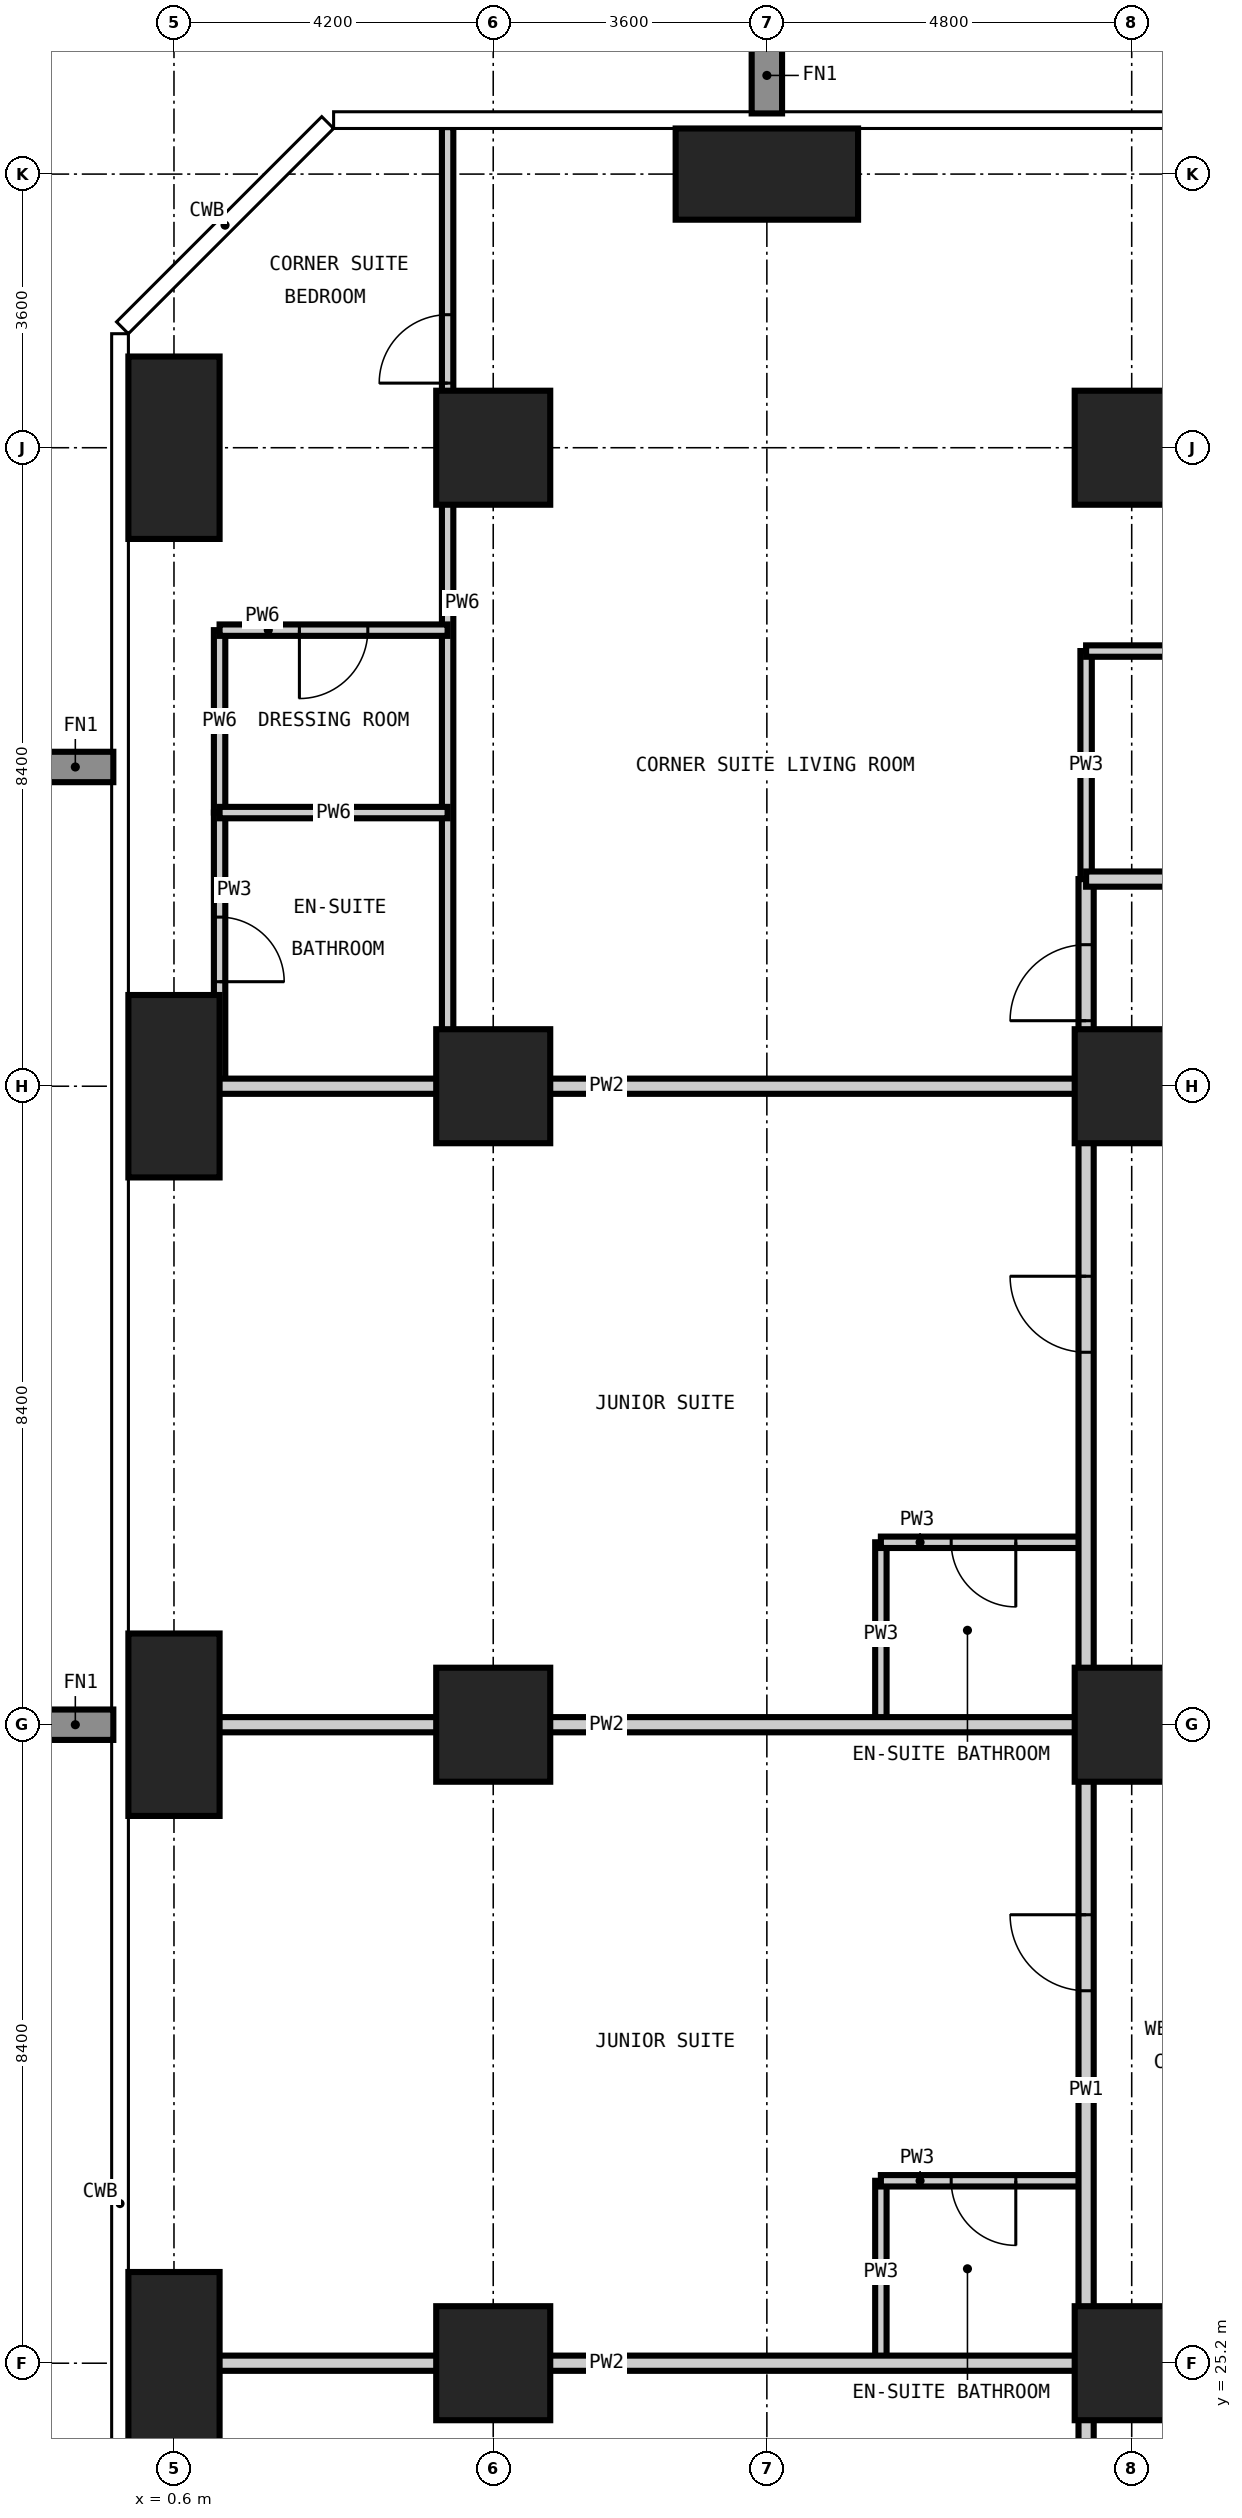
"""IFC4 building model, lengths in metres.
Left out: names, types, materials, properties, quantities, classifications, styles, units other than length and angle.
Written with IfcOpenShell. Run it as: python <this file> out.ifc"""

import sys

from ifc_helpers import new_model, si_unit, direction, frame, frame_2d, origin, origin_2d, place, context, subcontext, project, spatial, rectangle, extrude, element, fill, save


model = new_model("IFC4")
c1 = context("Model", 3, precision=1e-05, world=origin(), true_north=direction((0.0, 1.0)))
c2 = subcontext(c1, "Body", "Model", "MODEL_VIEW")
j1 = project(units=[si_unit("LENGTHUNIT", "METRE"), si_unit("PLANEANGLEUNIT", "RADIAN")], contexts=[c1])
p1 = place(None, origin())
s1 = spatial("IfcSite", under=j1, at=p1, CompositionType="ELEMENT")
p2 = place(p1, origin())
s2 = spatial("IfcBuilding", under=s1, at=p2, CompositionType="ELEMENT")
p3 = place(p2, frame((0.0, 0.0, 111.6)))
s3 = spatial("IfcBuildingStorey", under=s2, at=p3, CompositionType="ELEMENT", Elevation=111.6)
for number, where, z_axis, x_axis in (
    (1, (0.6, 25.2, -0.35), (0.0, 0.0, 1.0), (1.0, 0.0, 0.0)),
    (2, (0.6, 33.6, -0.35), (0.0, 0.0, 1.0), (1.0, 0.0, 0.0)),
    (3, (0.6, 42.0, -0.35), (0.0, 0.0, 1.0), (1.0, 0.0, 0.0)),
    (4, (0.6, 50.4, -0.35), (0.0, 0.0, 1.0), (1.0, 0.0, 0.0)),
):
    element("IfcColumn", number, at=place(p3, frame(where, z_axis=z_axis, x_axis=x_axis)), inside=s3, PredefinedType="COLUMN", context=c2, shape_type="SweptSolid", body=[
        extrude(rectangle(XDim=1.2, YDim=2.4, at=origin_2d()), origin(), (0.0, 0.0, 1.0), 3.6),
    ])
for number, where, z_axis, x_axis in (
    (5, (4.8, 25.2, -0.35), (0.0, 0.0, 1.0), (1.0, 0.0, 0.0)),
    (6, (4.8, 33.6, -0.35), (0.0, 0.0, 1.0), (1.0, 0.0, 0.0)),
    (7, (4.8, 42.0, -0.35), (0.0, 0.0, 1.0), (1.0, 0.0, 0.0)),
    (8, (4.8, 50.4, -0.35), (0.0, 0.0, 1.0), (1.0, 0.0, 0.0)),
):
    element("IfcColumn", number, at=place(p3, frame(where, z_axis=z_axis, x_axis=x_axis)), inside=s3, PredefinedType="COLUMN", context=c2, shape_type="SweptSolid", body=[
        extrude(rectangle(XDim=1.5, YDim=1.5, at=origin_2d()), origin(), (0.0, 0.0, 1.0), 3.6),
    ])
p4 = place(p3, frame((8.4, 54.0, -0.35), z_axis=(0.0, 0.0, 1.0), x_axis=(1.0, 0.0, 0.0)))
e9 = element("IfcColumn", 9, at=p4, inside=s3, PredefinedType="COLUMN", context=c2, shape_type="SweptSolid", body=[
    extrude(rectangle(XDim=2.4, YDim=1.2, at=origin_2d()), origin(), (0.0, 0.0, 1.0), 3.6),
])
for number, where, z_axis, x_axis in (
    (10, (13.2, 25.2, -0.35), (0.0, 0.0, 1.0), (1.0, 0.0, 0.0)),
    (11, (13.2, 33.6, -0.35), (0.0, 0.0, 1.0), (1.0, 0.0, 0.0)),
    (12, (13.2, 42.0, -0.35), (0.0, 0.0, 1.0), (1.0, 0.0, 0.0)),
    (13, (13.2, 50.4, -0.35), (0.0, 0.0, 1.0), (1.0, 0.0, 0.0)),
):
    element("IfcColumn", number, at=place(p3, frame(where, z_axis=z_axis, x_axis=x_axis)), inside=s3, PredefinedType="COLUMN", context=c2, shape_type="SweptSolid", body=[
        extrude(rectangle(XDim=1.5, YDim=1.5, at=origin_2d()), origin(), (0.0, 0.0, 1.0), 3.6),
    ])
p5 = place(p3, frame((1.2, 42.0, 0.0), z_axis=(0.0, 0.0, 1.0), x_axis=(0.0, 1.0, 0.0)))
e14 = element("IfcWall", 14, at=p5, inside=s3, PredefinedType="PARTITIONING", context=c2, shape_type="SweptSolid", body=[
    extrude(rectangle(XDim=3.6, YDim=0.15, at=frame_2d((1.8, 0.0))), origin(), (0.0, 0.0, 1.0), 3.25),
])
p6 = place(p5, frame((1.375, 0.0, 0.0)))
e15 = element("IfcOpeningElement", 15, at=p6, cuts=e14, PredefinedType="OPENING", context=c2, shape_type="SweptSolid", body=[
    extrude(rectangle(XDim=0.85, YDim=2.1, at=frame_2d((0.425, 1.05))), frame((0.0, 0.085, 0.0), z_axis=(0.0, -1.0, 0.0), x_axis=(1.0, 0.0, 0.0)), (0.0, 0.0, 1.0), 0.17),
])
p7 = place(p3, frame((9.9, 25.2, 0.0), z_axis=(0.0, 0.0, 1.0), x_axis=(0.0, 1.0, 0.0)))
e16 = element("IfcWall", 16, at=p7, inside=s3, PredefinedType="PARTITIONING", context=c2, shape_type="SweptSolid", body=[
    extrude(rectangle(XDim=2.4, YDim=0.15, at=frame_2d((1.2, 0.0))), origin(), (0.0, 0.0, 1.0), 3.25),
])
p8 = place(p3, frame((9.9, 33.6, 0.0), z_axis=(0.0, 0.0, 1.0), x_axis=(0.0, 1.0, 0.0)))
e17 = element("IfcWall", 17, at=p8, inside=s3, PredefinedType="PARTITIONING", context=c2, shape_type="SweptSolid", body=[
    extrude(rectangle(XDim=2.4, YDim=0.15, at=frame_2d((1.2, 0.0))), origin(), (0.0, 0.0, 1.0), 3.25),
])
p9 = place(p3, frame((12.6, 44.725, 0.0), z_axis=(0.0, 0.0, 1.0), x_axis=(0.0, 1.0, 0.0)))
e18 = element("IfcWall", 18, at=p9, inside=s3, PredefinedType="PARTITIONING", context=c2, shape_type="SweptSolid", body=[
    extrude(rectangle(XDim=3.0, YDim=0.15, at=frame_2d((1.5, 0.0))), origin(), (0.0, 0.0, 1.0), 3.25),
])
p10 = place(p3, frame((9.9, 27.6, 0.0), z_axis=(0.0, 0.0, 1.0), x_axis=(1.0, 0.0, 0.0)))
e19 = element("IfcWall", 19, at=p10, inside=s3, PredefinedType="PARTITIONING", context=c2, shape_type="SweptSolid", body=[
    extrude(rectangle(XDim=2.7, YDim=0.15, at=frame_2d((1.35, 0.0))), origin(), (0.0, 0.0, 1.0), 3.25),
])
p11 = place(p10, frame((0.925, 0.0, 0.0)))
e20 = element("IfcOpeningElement", 20, at=p11, cuts=e19, PredefinedType="OPENING", context=c2, shape_type="SweptSolid", body=[
    extrude(rectangle(XDim=0.85, YDim=2.1, at=frame_2d((0.425, 1.05))), frame((0.0, 0.085, 0.0), z_axis=(0.0, -1.0, 0.0), x_axis=(1.0, 0.0, 0.0)), (0.0, 0.0, 1.0), 0.17),
])
p12 = place(p3, frame((9.9, 36.0, 0.0), z_axis=(0.0, 0.0, 1.0), x_axis=(1.0, 0.0, 0.0)))
e21 = element("IfcWall", 21, at=p12, inside=s3, PredefinedType="PARTITIONING", context=c2, shape_type="SweptSolid", body=[
    extrude(rectangle(XDim=2.7, YDim=0.15, at=frame_2d((1.35, 0.0))), origin(), (0.0, 0.0, 1.0), 3.25),
])
p13 = place(p12, frame((0.925, 0.0, 0.0)))
e22 = element("IfcOpeningElement", 22, at=p13, cuts=e21, PredefinedType="OPENING", context=c2, shape_type="SweptSolid", body=[
    extrude(rectangle(XDim=0.85, YDim=2.1, at=frame_2d((0.425, 1.05))), frame((0.0, 0.085, 0.0), z_axis=(0.0, -1.0, 0.0), x_axis=(1.0, 0.0, 0.0)), (0.0, 0.0, 1.0), 0.17),
])
p14 = place(p3, frame((12.6, 47.725, 0.0), z_axis=(0.0, 0.0, 1.0), x_axis=(1.0, 0.0, 0.0)))
e23 = element("IfcWall", 23, at=p14, inside=s3, PredefinedType="PARTITIONING", context=c2, shape_type="SweptSolid", body=[
    extrude(rectangle(XDim=4.2, YDim=0.15, at=frame_2d((2.1, 0.0))), origin(), (0.0, 0.0, 1.0), 3.25),
])
p15 = place(p14, frame((1.675, 0.0, 0.0)))
e24 = element("IfcOpeningElement", 24, at=p15, cuts=e23, PredefinedType="OPENING", context=c2, shape_type="SweptSolid", body=[
    extrude(rectangle(XDim=0.85, YDim=2.1, at=frame_2d((0.425, 1.05))), frame((0.0, 0.085, 0.0), z_axis=(0.0, -1.0, 0.0), x_axis=(1.0, 0.0, 0.0)), (0.0, 0.0, 1.0), 0.17),
])
p16 = place(p3, frame((12.6, 12.875, 0.0), z_axis=(0.0, 0.0, 1.0), x_axis=(0.0, 1.0, 0.0)))
e25 = element("IfcWall", 25, at=p16, inside=s3, PredefinedType="PARTITIONING", context=c2, shape_type="SweptSolid", body=[
    extrude(rectangle(XDim=31.85, YDim=0.2, at=frame_2d((15.925, 0.0))), origin(), (0.0, 0.0, 1.0), 3.25),
])
p17 = place(p16, frame((8.825, 0.0, 0.0)))
e26 = element("IfcOpeningElement", 26, at=p17, cuts=e25, PredefinedType="OPENING", context=c2, shape_type="SweptSolid", body=[
    extrude(rectangle(XDim=1.0, YDim=2.2, at=frame_2d((0.5, 1.1))), frame((0.0, 0.11, 0.0), z_axis=(0.0, -1.0, 0.0), x_axis=(1.0, 0.0, 0.0)), (0.0, 0.0, 1.0), 0.22),
])
p18 = place(p16, frame((17.225, 0.0, 0.0)))
e27 = element("IfcOpeningElement", 27, at=p18, cuts=e25, PredefinedType="OPENING", context=c2, shape_type="SweptSolid", body=[
    extrude(rectangle(XDim=1.0, YDim=2.2, at=frame_2d((0.5, 1.1))), frame((0.0, 0.11, 0.0), z_axis=(0.0, -1.0, 0.0), x_axis=(1.0, 0.0, 0.0)), (0.0, 0.0, 1.0), 0.22),
])
p19 = place(p16, frame((25.625, 0.0, 0.0)))
e28 = element("IfcOpeningElement", 28, at=p19, cuts=e25, PredefinedType="OPENING", context=c2, shape_type="SweptSolid", body=[
    extrude(rectangle(XDim=1.0, YDim=2.2, at=frame_2d((0.5, 1.1))), frame((0.0, 0.11, 0.0), z_axis=(0.0, -1.0, 0.0), x_axis=(1.0, 0.0, 0.0)), (0.0, 0.0, 1.0), 0.22),
])
p20 = place(p16, frame((1.463, 0.0, 0.0)))
e29 = element("IfcOpeningElement", 29, at=p20, cuts=e25, PredefinedType="OPENING", context=c2, shape_type="SweptSolid", body=[
    extrude(rectangle(XDim=1.0, YDim=2.2, at=frame_2d((0.5, 1.1))), frame((0.0, 0.11, 0.0), z_axis=(0.0, -1.0, 0.0), x_axis=(1.0, 0.0, 0.0)), (0.0, 0.0, 1.0), 0.22),
])
p21 = place(p16, frame((29.987, 0.0, 0.0)))
e30 = element("IfcOpeningElement", 30, at=p21, cuts=e25, PredefinedType="OPENING", context=c2, shape_type="SweptSolid", body=[
    extrude(rectangle(XDim=1.0, YDim=2.2, at=frame_2d((0.5, 1.1))), frame((0.0, 0.11, 0.0), z_axis=(0.0, -1.0, 0.0), x_axis=(1.0, 0.0, 0.0)), (0.0, 0.0, 1.0), 0.22),
])
p22 = place(p3, frame((12.6, 44.725, 0.0), z_axis=(0.0, 0.0, 1.0), x_axis=(1.0, 0.0, 0.0)))
e31 = element("IfcWall", 31, at=p22, inside=s3, PredefinedType="PARTITIONING", context=c2, shape_type="SweptSolid", body=[
    extrude(rectangle(XDim=32.725, YDim=0.2, at=frame_2d((16.362, 0.0))), origin(), (0.0, 0.0, 1.0), 3.25),
])
p23 = place(p22, frame((9.1, 0.0, 0.0)))
e32 = element("IfcOpeningElement", 32, at=p23, cuts=e31, PredefinedType="OPENING", context=c2, shape_type="SweptSolid", body=[
    extrude(rectangle(XDim=1.0, YDim=2.2, at=frame_2d((0.5, 1.1))), frame((0.0, 0.11, 0.0), z_axis=(0.0, -1.0, 0.0), x_axis=(1.0, 0.0, 0.0)), (0.0, 0.0, 1.0), 0.22),
])
p24 = place(p22, frame((17.5, 0.0, 0.0)))
e33 = element("IfcOpeningElement", 33, at=p24, cuts=e31, PredefinedType="OPENING", context=c2, shape_type="SweptSolid", body=[
    extrude(rectangle(XDim=1.0, YDim=2.2, at=frame_2d((0.5, 1.1))), frame((0.0, 0.11, 0.0), z_axis=(0.0, -1.0, 0.0), x_axis=(1.0, 0.0, 0.0)), (0.0, 0.0, 1.0), 0.22),
])
p25 = place(p22, frame((25.9, 0.0, 0.0)))
e34 = element("IfcOpeningElement", 34, at=p25, cuts=e31, PredefinedType="OPENING", context=c2, shape_type="SweptSolid", body=[
    extrude(rectangle(XDim=1.0, YDim=2.2, at=frame_2d((0.5, 1.1))), frame((0.0, 0.11, 0.0), z_axis=(0.0, -1.0, 0.0), x_axis=(1.0, 0.0, 0.0)), (0.0, 0.0, 1.0), 0.22),
])
for number, where, z_axis, x_axis in (
    (35, (-0.018, 25.2, 0.0), (0.0, 0.0, 1.0), (1.0, 0.0, 0.0)),
    (36, (-0.018, 33.6, 0.0), (0.0, 0.0, 1.0), (1.0, 0.0, 0.0)),
    (37, (-0.018, 42.0, 0.0), (0.0, 0.0, 1.0), (1.0, 0.0, 0.0)),
):
    element("IfcWall", number, at=place(p3, frame(where, z_axis=z_axis, x_axis=x_axis)), inside=s3, PredefinedType="PARTITIONING", context=c2, shape_type="SweptSolid", body=[
        extrude(rectangle(XDim=12.618, YDim=0.2, at=frame_2d((6.309, 0.0))), origin(), (0.0, 0.0, 1.0), 3.25),
    ])
p26 = place(p3, frame((1.2, 45.6, 0.0), z_axis=(0.0, 0.0, 1.0), x_axis=(0.0, 1.0, 0.0)))
e38 = element("IfcWall", 38, at=p26, inside=s3, PredefinedType="PARTITIONING", context=c2, shape_type="SweptSolid", body=[
    extrude(rectangle(XDim=2.4, YDim=0.15, at=frame_2d((1.2, 0.0))), origin(), (0.0, 0.0, 1.0), 3.25),
])
p27 = place(p3, frame((4.2, 42.0, 0.0), z_axis=(0.0, 0.0, 1.0), x_axis=(0.0, 1.0, 0.0)))
e39 = element("IfcWall", 39, at=p27, inside=s3, PredefinedType="PARTITIONING", context=c2, shape_type="SweptSolid", body=[
    extrude(rectangle(XDim=12.618, YDim=0.15, at=frame_2d((6.309, 0.0))), origin(), (0.0, 0.0, 1.0), 3.25),
])
p28 = place(p27, frame((9.25, 0.0, 0.0)))
e40 = element("IfcOpeningElement", 40, at=p28, cuts=e39, PredefinedType="OPENING", context=c2, shape_type="SweptSolid", body=[
    extrude(rectangle(XDim=0.9, YDim=2.1, at=frame_2d((0.45, 1.05))), frame((0.0, 0.085, 0.0), z_axis=(0.0, -1.0, 0.0), x_axis=(1.0, 0.0, 0.0)), (0.0, 0.0, 1.0), 0.17),
])
p29 = place(p3, frame((1.2, 45.6, 0.0), z_axis=(0.0, 0.0, 1.0), x_axis=(1.0, 0.0, 0.0)))
e41 = element("IfcWall", 41, at=p29, inside=s3, PredefinedType="PARTITIONING", context=c2, shape_type="SweptSolid", body=[
    extrude(rectangle(XDim=3.0, YDim=0.15, at=frame_2d((1.5, 0.0))), origin(), (0.0, 0.0, 1.0), 3.25),
])
p30 = place(p3, frame((1.2, 48.0, 0.0), z_axis=(0.0, 0.0, 1.0), x_axis=(1.0, 0.0, 0.0)))
e42 = element("IfcWall", 42, at=p30, inside=s3, PredefinedType="PARTITIONING", context=c2, shape_type="SweptSolid", body=[
    extrude(rectangle(XDim=3.0, YDim=0.15, at=frame_2d((1.5, 0.0))), origin(), (0.0, 0.0, 1.0), 3.25),
])
p31 = place(p30, frame((1.05, 0.0, 0.0)))
e43 = element("IfcOpeningElement", 43, at=p31, cuts=e42, PredefinedType="OPENING", context=c2, shape_type="SweptSolid", body=[
    extrude(rectangle(XDim=0.9, YDim=2.1, at=frame_2d((0.45, 1.05))), frame((0.0, 0.085, 0.0), z_axis=(0.0, -1.0, 0.0), x_axis=(1.0, 0.0, 0.0)), (0.0, 0.0, 1.0), 0.17),
])
p32 = place(p18, origin())
e44 = element("IfcDoor", 44, at=p32, inside=s3, OperationType="SINGLE_SWING_RIGHT", PredefinedType="DOOR", context=c2, shape_type="SweptSolid", body=[
    extrude(rectangle(XDim=1.0, YDim=2.2, at=frame_2d((0.5, 1.1))), frame((0.0, 0.025, 0.0), z_axis=(0.0, -1.0, 0.0), x_axis=(1.0, 0.0, 0.0)), (0.0, 0.0, 1.0), 0.05),
])
fill(e27, e44)
p33 = place(p11, frame((0.85, 0.0, 0.0), z_axis=(0.0, 0.0, 1.0), x_axis=(-1.0, 0.0, 0.0)))
e45 = element("IfcDoor", 45, at=p33, inside=s3, OperationType="SINGLE_SWING_LEFT", PredefinedType="DOOR", context=c2, shape_type="SweptSolid", body=[
    extrude(rectangle(XDim=0.85, YDim=2.1, at=frame_2d((0.425, 1.05))), frame((0.0, 0.025, 0.0), z_axis=(0.0, -1.0, 0.0), x_axis=(1.0, 0.0, 0.0)), (0.0, 0.0, 1.0), 0.05),
])
fill(e20, e45)
p34 = place(p19, origin())
e46 = element("IfcDoor", 46, at=p34, inside=s3, OperationType="SINGLE_SWING_RIGHT", PredefinedType="DOOR", context=c2, shape_type="SweptSolid", body=[
    extrude(rectangle(XDim=1.0, YDim=2.2, at=frame_2d((0.5, 1.1))), frame((0.0, 0.025, 0.0), z_axis=(0.0, -1.0, 0.0), x_axis=(1.0, 0.0, 0.0)), (0.0, 0.0, 1.0), 0.05),
])
fill(e28, e46)
p35 = place(p13, frame((0.85, 0.0, 0.0), z_axis=(0.0, 0.0, 1.0), x_axis=(-1.0, 0.0, 0.0)))
e47 = element("IfcDoor", 47, at=p35, inside=s3, OperationType="SINGLE_SWING_LEFT", PredefinedType="DOOR", context=c2, shape_type="SweptSolid", body=[
    extrude(rectangle(XDim=0.85, YDim=2.1, at=frame_2d((0.425, 1.05))), frame((0.0, 0.025, 0.0), z_axis=(0.0, -1.0, 0.0), x_axis=(1.0, 0.0, 0.0)), (0.0, 0.0, 1.0), 0.05),
])
fill(e22, e47)
p36 = place(p21, origin())
e48 = element("IfcDoor", 48, at=p36, inside=s3, OperationType="SINGLE_SWING_LEFT", PredefinedType="DOOR", context=c2, shape_type="SweptSolid", body=[
    extrude(rectangle(XDim=1.0, YDim=2.2, at=frame_2d((0.5, 1.1))), frame((0.0, 0.025, 0.0), z_axis=(0.0, -1.0, 0.0), x_axis=(1.0, 0.0, 0.0)), (0.0, 0.0, 1.0), 0.05),
])
fill(e30, e48)
p37 = place(p28, origin())
e49 = element("IfcDoor", 49, at=p37, inside=s3, OperationType="SINGLE_SWING_LEFT", PredefinedType="DOOR", context=c2, shape_type="SweptSolid", body=[
    extrude(rectangle(XDim=0.9, YDim=2.1, at=frame_2d((0.45, 1.05))), frame((0.0, 0.025, 0.0), z_axis=(0.0, -1.0, 0.0), x_axis=(1.0, 0.0, 0.0)), (0.0, 0.0, 1.0), 0.05),
])
fill(e40, e49)
p38 = place(p6, frame((0.85, 0.0, 0.0), z_axis=(0.0, 0.0, 1.0), x_axis=(-1.0, 0.0, 0.0)))
e50 = element("IfcDoor", 50, at=p38, inside=s3, OperationType="SINGLE_SWING_RIGHT", PredefinedType="DOOR", context=c2, shape_type="SweptSolid", body=[
    extrude(rectangle(XDim=0.85, YDim=2.1, at=frame_2d((0.425, 1.05))), frame((0.0, 0.025, 0.0), z_axis=(0.0, -1.0, 0.0), x_axis=(1.0, 0.0, 0.0)), (0.0, 0.0, 1.0), 0.05),
])
fill(e15, e50)
p39 = place(p31, frame((0.9, 0.0, 0.0), z_axis=(0.0, 0.0, 1.0), x_axis=(-1.0, 0.0, 0.0)))
e51 = element("IfcDoor", 51, at=p39, inside=s3, OperationType="SINGLE_SWING_RIGHT", PredefinedType="DOOR", context=c2, shape_type="SweptSolid", body=[
    extrude(rectangle(XDim=0.9, YDim=2.1, at=frame_2d((0.45, 1.05))), frame((0.0, 0.025, 0.0), z_axis=(0.0, -1.0, 0.0), x_axis=(1.0, 0.0, 0.0)), (0.0, 0.0, 1.0), 0.05),
])
fill(e43, e51)
save(model, sys.argv[1])
